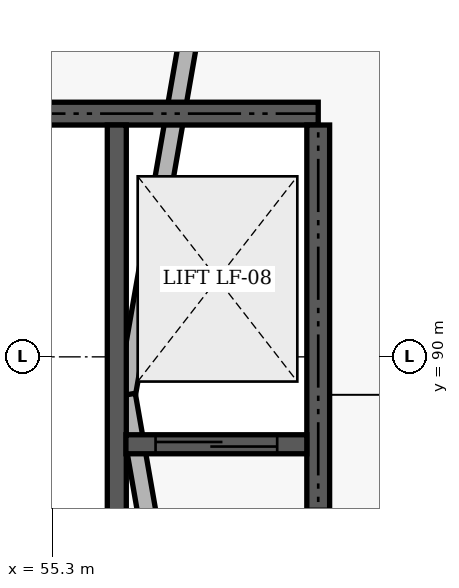
"""IFC4 building model, lengths in metres.
Left out: names, types, materials, properties, quantities, classifications, styles, units other than length and angle.
Written with IfcOpenShell. Run it as: python <this file> out.ifc"""

import sys

from ifc_helpers import new_model, si_unit, direction, frame, frame_2d, origin, place, context, subcontext, project, spatial, rectangle, extrude, element, fill, save


model = new_model("IFC4")
c1 = context("Model", 3, precision=1e-05, world=origin(), true_north=direction((0.0, 1.0)))
c2 = subcontext(c1, "Body", "Model", "MODEL_VIEW")
j1 = project(units=[si_unit("LENGTHUNIT", "METRE"), si_unit("PLANEANGLEUNIT", "RADIAN")], contexts=[c1])
p1 = place(None, origin())
s1 = spatial("IfcSite", under=j1, at=p1, CompositionType="ELEMENT")
p2 = place(p1, origin())
s2 = spatial("IfcBuilding", under=s1, at=p2, CompositionType="ELEMENT")
p3 = place(p2, frame((0.0, 0.0, 9.6)))
s3 = spatial("IfcBuildingStorey", under=s2, at=p3, CompositionType="ELEMENT", Elevation=9.6)
p4 = place(p3, frame((55.727, 98.248, 4.53), z_axis=(0.0, 0.0, 1.0), x_axis=(-0.171964181022, -0.985103202941, 0.0)))
e1 = element("IfcWall", 1, at=p4, inside=s3, PredefinedType="SOLIDWALL", context=c2, shape_type="SweptSolid", body=[
    extrude(rectangle(XDim=8.88, YDim=0.34, at=frame_2d((4.44, 0.0))), origin(), (0.0, 0.0, 1.0), 3.02),
])
p5 = place(p3, frame((57.731, 97.84, 7.58), z_axis=(0.0, 0.0, 1.0), x_axis=(-0.171983700119, -0.985099795398, 0.0)))
e2 = element("IfcWall", 2, at=p5, inside=s3, PredefinedType="SOLIDWALL", context=c2, shape_type="SweptSolid", body=[
    extrude(rectangle(XDim=8.466, YDim=0.24, at=frame_2d((4.233, 0.0))), origin(), (0.0, 0.0, 1.0), 2.37),
])
p6 = place(p3, frame((54.2, 89.5, 4.53), z_axis=(0.0, 0.0, 1.0), x_axis=(0.171964181022, -0.985103202941, 0.0)))
e3 = element("IfcWall", 3, at=p6, inside=s3, PredefinedType="SOLIDWALL", context=c2, shape_type="SweptSolid", body=[
    extrude(rectangle(XDim=8.88, YDim=0.34, at=frame_2d((4.44, 0.0))), origin(), (0.0, 0.0, 1.0), 3.02),
])
p7 = place(p3, frame((56.275, 89.5, 7.58), z_axis=(0.0, 0.0, 1.0), x_axis=(0.171983700119, -0.985099795398, 0.0)))
e4 = element("IfcWall", 4, at=p7, inside=s3, PredefinedType="SOLIDWALL", context=c2, shape_type="SweptSolid", body=[
    extrude(rectangle(XDim=8.466, YDim=0.24, at=frame_2d((4.233, 0.0))), origin(), (0.0, 0.0, 1.0), 2.37),
])
p8 = place(p3, frame((52.2, 93.2, 0.0), z_axis=(0.0, 0.0, 1.0), x_axis=(1.0, 0.0, 0.0)))
e5 = element("IfcWall", 5, at=p8, inside=s3, PredefinedType="SHEAR", context=c2, shape_type="SweptSolid", body=[
    extrude(rectangle(XDim=6.6, YDim=0.3, at=frame_2d((3.3, 0.0))), origin(), (0.0, 0.0, 1.0), 3.4),
])
p9 = place(p3, frame((58.8, 85.95, 0.0), z_axis=(0.0, 0.0, 1.0), x_axis=(0.0, 1.0, 0.0)))
e6 = element("IfcWall", 6, at=p9, inside=s3, PredefinedType="SHEAR", context=c2, shape_type="SweptSolid", body=[
    extrude(rectangle(XDim=7.1, YDim=0.3, at=frame_2d((3.55, 0.0))), origin(), (0.0, 0.0, 1.0), 3.4),
])
p10 = place(p9, frame((0.75, 0.0, 0.0)))
e7 = element("IfcOpeningElement", 7, at=p10, cuts=e6, PredefinedType="OPENING", context=c2, shape_type="SweptSolid", body=[
    extrude(rectangle(XDim=1.3, YDim=2.15, at=frame_2d((0.65, 1.075))), frame((0.0, 0.16, 0.0), z_axis=(0.0, -1.0, 0.0), x_axis=(1.0, 0.0, 0.0)), (0.0, 0.0, 1.0), 0.32),
])
p11 = place(p3, frame((56.15, 85.95, 0.0), z_axis=(0.0, 0.0, 1.0), x_axis=(0.0, 1.0, 0.0)))
e8 = element("IfcWall", 8, at=p11, inside=s3, PredefinedType="SHEAR", context=c2, shape_type="SweptSolid", body=[
    extrude(rectangle(XDim=7.1, YDim=0.25, at=frame_2d((3.55, 0.0))), origin(), (0.0, 0.0, 1.0), 3.4),
])
p12 = place(p11, frame((0.2, 0.0, 0.0)))
e9 = element("IfcOpeningElement", 9, at=p12, cuts=e8, PredefinedType="OPENING", context=c2, shape_type="SweptSolid", body=[
    extrude(rectangle(XDim=1.15, YDim=2.15, at=frame_2d((0.575, 1.075))), frame((0.0, 0.135, 0.0), z_axis=(0.0, -1.0, 0.0), x_axis=(1.0, 0.0, 0.0)), (0.0, 0.0, 1.0), 0.27),
])
p13 = place(p3, frame((56.27, 88.85, 0.0), z_axis=(0.0, 0.0, 1.0), x_axis=(1.0, 0.0, 0.0)))
e10 = element("IfcWall", 10, at=p13, inside=s3, PredefinedType="SHEAR", context=c2, shape_type="SweptSolid", body=[
    extrude(rectangle(XDim=2.38, YDim=0.25, at=frame_2d((1.19, 0.0))), origin(), (0.0, 0.0, 1.0), 3.4),
])
p14 = place(p13, frame((0.39, 0.0, 0.0)))
e11 = element("IfcOpeningElement", 11, at=p14, cuts=e10, PredefinedType="OPENING", context=c2, shape_type="SweptSolid", body=[
    extrude(rectangle(XDim=1.6, YDim=2.3, at=frame_2d((0.8, 1.15))), frame((0.0, 0.135, 0.0), z_axis=(0.0, -1.0, 0.0), x_axis=(1.0, 0.0, 0.0)), (0.0, 0.0, 1.0), 0.27),
])
p15 = place(p10, frame((1.3, 0.0, 0.0), z_axis=(0.0, 0.0, 1.0), x_axis=(-1.0, 0.0, 0.0)))
e12 = element("IfcDoor", 12, at=p15, inside=s3, OperationType="DOUBLE_DOOR_SINGLE_SWING", PredefinedType="DOOR", context=c2, shape_type="SweptSolid", body=[
    extrude(rectangle(XDim=1.3, YDim=2.15, at=frame_2d((0.65, 1.075))), frame((0.0, 0.025, 0.0), z_axis=(0.0, -1.0, 0.0), x_axis=(1.0, 0.0, 0.0)), (0.0, 0.0, 1.0), 0.05),
])
fill(e7, e12)
p16 = place(p14, origin())
e13 = element("IfcDoor", 13, at=p16, inside=s3, OperationType="SLIDING_TO_LEFT", PredefinedType="DOOR", context=c2, shape_type="SweptSolid", body=[
    extrude(rectangle(XDim=1.6, YDim=2.3, at=frame_2d((0.8, 1.15))), frame((0.0, 0.025, 0.0), z_axis=(0.0, -1.0, 0.0), x_axis=(1.0, 0.0, 0.0)), (0.0, 0.0, 1.0), 0.05),
])
fill(e11, e13)
save(model, sys.argv[1])
